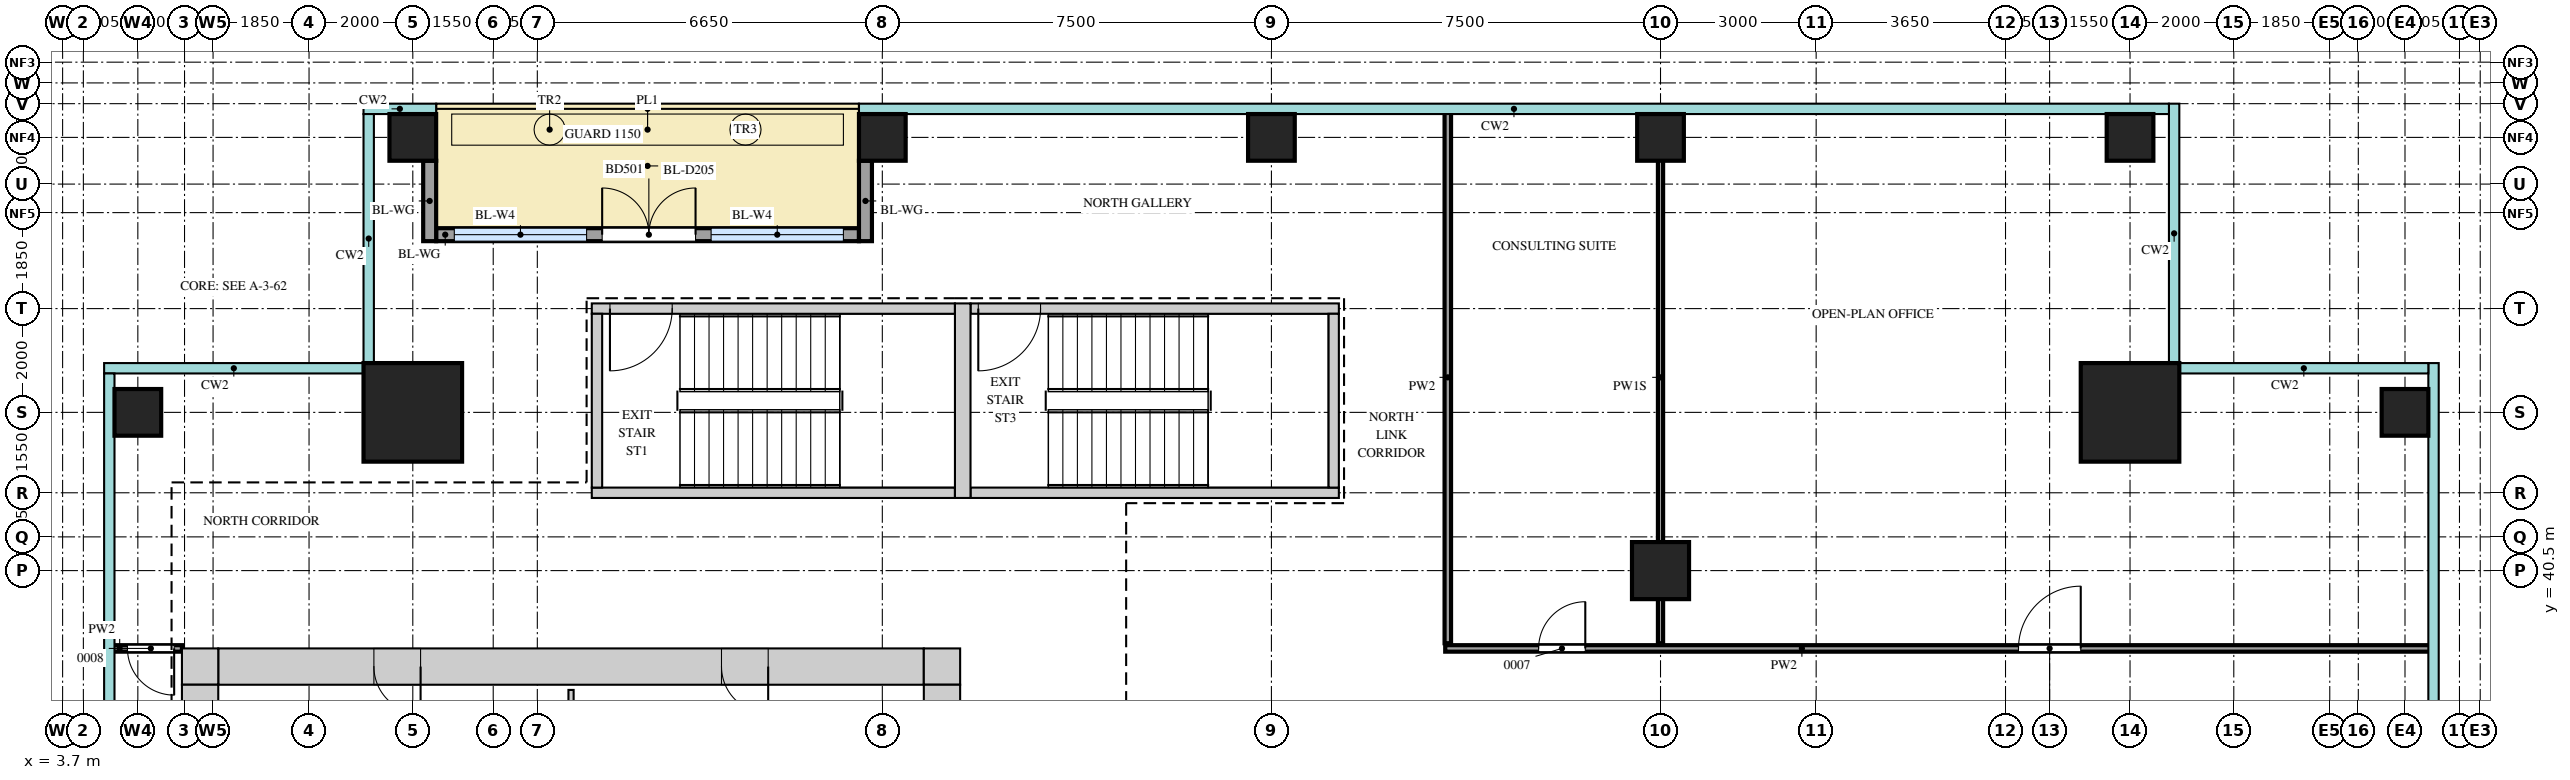
"""IFC4 building model, lengths in metres.
Left out: names, types, materials, properties, quantities, classifications, styles, units other than length and angle.
Written with IfcOpenShell. Run it as: python <this file> out.ifc"""

import sys

from ifc_helpers import new_model, si_unit, direction, frame, frame_2d, origin, origin_2d, place, context, subcontext, project, spatial, rectangle, extrude, source, transform, mapped, element, fill, save


model = new_model("IFC4")
c1 = context("Model", 3, precision=1e-05, world=origin(), true_north=direction((0.0, 1.0)))
c2 = subcontext(c1, "Body", "Model", "MODEL_VIEW")
j1 = project(units=[si_unit("LENGTHUNIT", "METRE"), si_unit("PLANEANGLEUNIT", "RADIAN")], contexts=[c1])
p1 = place(None, origin())
s1 = spatial("IfcSite", under=j1, at=p1, CompositionType="ELEMENT")
p2 = place(p1, origin())
s2 = spatial("IfcBuilding", under=s1, at=p2, CompositionType="ELEMENT")
p3 = place(p2, frame((0.0, 0.0, 226.2)))
s3 = spatial("IfcBuildingStorey", under=s2, at=p3, CompositionType="ELEMENT", Elevation=226.2)
m1 = source(origin(), c2, "Body", "SweptSolid", [
    extrude(rectangle(XDim=13.6, YDim=0.7, at=frame_2d((6.8, 0.0))), origin(), (0.0, 0.0, 1.0), 3.75),
])
p4 = place(p3, frame((6.7, 38.65, 0.0), z_axis=(0.0, 0.0, 1.0), x_axis=(1.0, 0.0, 0.0)))
e1 = element("IfcWall", 1, at=p4, inside=s3, PredefinedType="SHEAR", context=c2, shape_type="MappedRepresentation", body=[
    mapped(m1, transform((0.0, 0.0, 0.0))),
])
m2 = source(origin(), c2, "Body", "SweptSolid", [
    extrude(rectangle(XDim=0.9, YDim=2.1, at=frame_2d((0.45, 1.05))), frame((0.0, 0.36, 0.0), z_axis=(0.0, -1.0, 0.0), x_axis=(1.0, 0.0, 0.0)), (0.0, 0.0, 1.0), 0.72),
])
p5 = place(p4, frame((3.0, 0.0, 0.0)))
e2 = element("IfcOpeningElement", 2, at=p5, cuts=e1, PredefinedType="OPENING", context=c2, shape_type="MappedRepresentation", body=[
    mapped(m2, transform((0.0, 0.0, 0.0))),
])
p6 = place(p4, frame((9.7, 0.0, 0.0)))
e3 = element("IfcOpeningElement", 3, at=p6, cuts=e1, PredefinedType="OPENING", context=c2, shape_type="MappedRepresentation", body=[
    mapped(m2, transform((0.0, 0.0, 0.0))),
])
m3 = source(origin(), c2, "Body", "SweptSolid", [
    extrude(rectangle(XDim=0.7, YDim=0.7, at=frame_2d((0.35, 0.0))), origin(), (0.0, 0.0, 1.0), 3.75),
])
for number, where, z_axis, x_axis in (
    (4, (20.3, 38.65, 0.0), (0.0, 0.0, 1.0), (1.0, 0.0, 0.0)),
    (5, (6.0, 38.65, 0.0), (0.0, 0.0, 1.0), (1.0, 0.0, 0.0)),
):
    element("IfcWall", number, at=place(p3, frame(where, z_axis=z_axis, x_axis=x_axis)), inside=s3, PredefinedType="SHEAR", context=c2, shape_type="MappedRepresentation", body=[
        mapped(m3, transform((0.0, 0.0, 0.0))),
    ])
m4 = source(origin(), c2, "Body", "SweptSolid", [
    extrude(rectangle(XDim=22.6, YDim=0.7, at=frame_2d((11.3, 0.0))), origin(), (0.0, 0.0, 1.0), 3.75),
])
p7 = place(p3, frame((20.65, 15.7, 0.0), z_axis=(0.0, 0.0, 1.0), x_axis=(0.0, 1.0, 0.0)))
e6 = element("IfcWall", 6, at=p7, inside=s3, PredefinedType="SHEAR", context=c2, shape_type="MappedRepresentation", body=[
    mapped(m4, transform((0.0, 0.0, 0.0))),
])
m5 = source(origin(), c2, "Body", "SweptSolid", [
    extrude(rectangle(XDim=1.8, YDim=2.1, at=frame_2d((0.9, 1.05))), frame((0.0, 0.36, 0.0), z_axis=(0.0, -1.0, 0.0), x_axis=(1.0, 0.0, 0.0)), (0.0, 0.0, 1.0), 0.72),
])
p8 = place(p7, frame((10.8, 0.0, 0.0)))
e7 = element("IfcOpeningElement", 7, at=p8, cuts=e6, PredefinedType="OPENING", context=c2, shape_type="MappedRepresentation", body=[
    mapped(m5, transform((0.0, 0.0, 0.0))),
])
p9 = place(p7, frame((0.45, 0.0, 0.0)))
e8 = element("IfcOpeningElement", 8, at=p9, cuts=e6, PredefinedType="OPENING", context=c2, shape_type="MappedRepresentation", body=[
    mapped(m2, transform((0.0, 0.0, 0.0))),
])
p10 = place(p7, frame((2.9, 0.0, 0.0)))
e9 = element("IfcOpeningElement", 9, at=p10, cuts=e6, PredefinedType="OPENING", context=c2, shape_type="MappedRepresentation", body=[
    mapped(m2, transform((0.0, 0.0, 0.0))),
])
p11 = place(p7, frame((5.65, 0.0, 0.0)))
e10 = element("IfcOpeningElement", 10, at=p11, cuts=e6, PredefinedType="OPENING", context=c2, shape_type="MappedRepresentation", body=[
    mapped(m2, transform((0.0, 0.0, 0.0))),
])
p12 = place(p3, frame((6.35, 15.7, 0.0), z_axis=(0.0, 0.0, 1.0), x_axis=(0.0, 1.0, 0.0)))
e11 = element("IfcWall", 11, at=p12, inside=s3, PredefinedType="SHEAR", context=c2, shape_type="MappedRepresentation", body=[
    mapped(m4, transform((0.0, 0.0, 0.0))),
])
m6 = source(origin(), c2, "Body", "SweptSolid", [
    extrude(rectangle(XDim=7.0, YDim=0.2, at=frame_2d((3.5, 0.0))), origin(), (0.0, 0.0, 1.0), 3.75),
])
p13 = place(p3, frame((13.9, 45.55, 0.0), z_axis=(0.0, 0.0, 1.0), x_axis=(1.0, 0.0, 0.0)))
e12 = element("IfcWall", 12, at=p13, inside=s3, PredefinedType="SHEAR", context=c2, shape_type="MappedRepresentation", body=[
    mapped(m6, transform((0.0, 0.0, 0.0))),
])
m7 = source(origin(), c2, "Body", "SweptSolid", [
    extrude(rectangle(XDim=1.2, YDim=2.1, at=frame_2d((0.6, 1.05))), frame((0.0, 0.11, 0.0), z_axis=(0.0, -1.0, 0.0), x_axis=(1.0, 0.0, 0.0)), (0.0, 0.0, 1.0), 0.22),
])
p14 = place(p13, frame((0.35, 0.0, 0.0)))
e13 = element("IfcOpeningElement", 13, at=p14, cuts=e12, PredefinedType="OPENING", context=c2, shape_type="MappedRepresentation", body=[
    mapped(m7, transform((0.0, 0.0, 0.0))),
])
p15 = place(p3, frame((13.9, 42.0, 0.0), z_axis=(0.0, 0.0, 1.0), x_axis=(1.0, 0.0, 0.0)))
e14 = element("IfcWall", 14, at=p15, inside=s3, PredefinedType="SHEAR", context=c2, shape_type="MappedRepresentation", body=[
    mapped(m6, transform((0.0, 0.0, 0.0))),
])
m8 = source(origin(), c2, "Body", "SweptSolid", [
    extrude(rectangle(XDim=7.1, YDim=0.2, at=frame_2d((3.55, 0.0))), origin(), (0.0, 0.0, 1.0), 3.75),
])
p16 = place(p3, frame((21.2, 45.55, 0.0), z_axis=(0.0, 0.0, 1.0), x_axis=(1.0, 0.0, 0.0)))
e15 = element("IfcWall", 15, at=p16, inside=s3, PredefinedType="SHEAR", context=c2, shape_type="MappedRepresentation", body=[
    mapped(m8, transform((0.0, 0.0, 0.0))),
])
p17 = place(p16, frame((0.15, 0.0, 0.0)))
e16 = element("IfcOpeningElement", 16, at=p17, cuts=e15, PredefinedType="OPENING", context=c2, shape_type="MappedRepresentation", body=[
    mapped(m7, transform((0.0, 0.0, 0.0))),
])
p18 = place(p3, frame((21.2, 42.0, 0.0), z_axis=(0.0, 0.0, 1.0), x_axis=(1.0, 0.0, 0.0)))
e17 = element("IfcWall", 17, at=p18, inside=s3, PredefinedType="SHEAR", context=c2, shape_type="MappedRepresentation", body=[
    mapped(m8, transform((0.0, 0.0, 0.0))),
])
m9 = source(origin(), c2, "Body", "SweptSolid", [
    extrude(rectangle(XDim=3.75, YDim=0.3, at=frame_2d((1.875, 0.0))), origin(), (0.0, 0.0, 1.0), 3.75),
])
p19 = place(p3, frame((21.05, 41.9, 0.0), z_axis=(0.0, 0.0, 1.0), x_axis=(0.0, 1.0, 0.0)))
e18 = element("IfcWall", 18, at=p19, inside=s3, PredefinedType="SHEAR", context=c2, shape_type="MappedRepresentation", body=[
    mapped(m9, transform((0.0, 0.0, 0.0))),
])
m10 = source(origin(), c2, "Body", "SweptSolid", [
    extrude(rectangle(XDim=3.35, YDim=0.2, at=frame_2d((1.675, 0.0))), origin(), (0.0, 0.0, 1.0), 3.75),
])
for number, where, z_axis, x_axis in (
    (19, (14.0, 42.1, 0.0), (0.0, 0.0, 1.0), (0.0, 1.0, 0.0)),
    (20, (28.2, 42.1, 0.0), (0.0, 0.0, 1.0), (0.0, 1.0, 0.0)),
):
    element("IfcWall", number, at=place(p3, frame(where, z_axis=z_axis, x_axis=x_axis)), inside=s3, PredefinedType="SHEAR", context=c2, shape_type="MappedRepresentation", body=[
        mapped(m10, transform((0.0, 0.0, 0.0))),
    ])
m11 = source(origin(), c2, "Body", "SweptSolid", [
    extrude(rectangle(XDim=1.9, YDim=1.9, at=origin_2d()), origin(), (0.0, 0.0, 1.0), 4.0),
])
for number, where, z_axis, x_axis in (
    (21, (43.55, 43.55, 0.0), (0.0, 0.0, 1.0), (1.0, 0.0, 0.0)),
    (22, (10.45, 43.55, 0.0), (0.0, 0.0, 1.0), (1.0, 0.0, 0.0)),
):
    element("IfcColumn", number, at=place(p3, frame(where, z_axis=z_axis, x_axis=x_axis)), inside=s3, PredefinedType="COLUMN", context=c2, shape_type="MappedRepresentation", body=[
        mapped(m11, transform((0.0, 0.0, 0.0))),
    ])
m12 = source(origin(), c2, "Body", "SweptSolid", [
    extrude(rectangle(XDim=0.9, YDim=0.9, at=origin_2d()), origin(), (0.0, 0.0, 1.0), 3.75),
])
for number, where, z_axis, x_axis in (
    (23, (48.85, 43.55, 0.0), (0.0, 0.0, 1.0), (1.0, 0.0, 0.0)),
    (24, (10.45, 48.85, 0.0), (0.0, 0.0, 1.0), (1.0, 0.0, 0.0)),
    (25, (19.5, 48.85, 0.0), (0.0, 0.0, 1.0), (1.0, 0.0, 0.0)),
    (26, (27.0, 48.85, 0.0), (0.0, 0.0, 1.0), (1.0, 0.0, 0.0)),
    (27, (34.5, 48.85, 0.0), (0.0, 0.0, 1.0), (1.0, 0.0, 0.0)),
    (28, (43.55, 48.85, 0.0), (0.0, 0.0, 1.0), (1.0, 0.0, 0.0)),
    (29, (5.15, 43.55, 0.0), (0.0, 0.0, 1.0), (1.0, 0.0, 0.0)),
):
    element("IfcColumn", number, at=place(p3, frame(where, z_axis=z_axis, x_axis=x_axis)), inside=s3, PredefinedType="COLUMN", context=c2, shape_type="MappedRepresentation", body=[
        mapped(m12, transform((0.0, 0.0, 0.0))),
    ])
m13 = source(origin(), c2, "Body", "SweptSolid", [
    extrude(rectangle(XDim=1.1, YDim=1.1, at=origin_2d()), origin(), (0.0, 0.0, 1.0), 3.75),
])
p20 = place(p3, frame((34.5, 40.5, 0.0), z_axis=(0.0, 0.0, 1.0), x_axis=(1.0, 0.0, 0.0)))
e30 = element("IfcColumn", 30, at=p20, inside=s3, PredefinedType="COLUMN", context=c2, shape_type="MappedRepresentation", body=[
    mapped(m13, transform((0.0, 0.0, 0.0))),
])
m14 = source(origin(), c2, "Body", "SweptSolid", [
    extrude(rectangle(XDim=8.15, YDim=0.25, at=frame_2d((4.075, 0.0))), origin(), (0.0, 0.0, 1.0), 3.35),
])
p21 = place(p3, frame((10.9, 46.975, 0.0), z_axis=(0.0, 0.0, 1.0), x_axis=(1.0, 0.0, 0.0)))
e31 = element("IfcWall", 31, at=p21, inside=s3, PredefinedType="SOLIDWALL", context=c2, shape_type="MappedRepresentation", body=[
    mapped(m14, transform((0.0, 0.0, 0.0))),
])
m15 = source(origin(), c2, "Body", "SweptSolid", [
    extrude(rectangle(XDim=2.55, YDim=2.4, at=frame_2d((1.275, 1.2))), frame((0.0, 0.135, 0.0), z_axis=(0.0, -1.0, 0.0), x_axis=(1.0, 0.0, 0.0)), (0.0, 0.0, 1.0), 0.27),
])
p22 = place(p21, frame((0.35, 0.0, 0.0)))
e32 = element("IfcOpeningElement", 32, at=p22, cuts=e31, PredefinedType="OPENING", context=c2, shape_type="MappedRepresentation", body=[
    mapped(m15, transform((0.0, 0.0, 0.0))),
])
p23 = place(p21, frame((5.3, 0.0, 0.0)))
e33 = element("IfcOpeningElement", 33, at=p23, cuts=e31, PredefinedType="OPENING", context=c2, shape_type="MappedRepresentation", body=[
    mapped(m15, transform((0.0, 0.0, 0.0))),
])
m16 = source(origin(), c2, "Body", "SweptSolid", [
    extrude(rectangle(XDim=1.8, YDim=2.4, at=frame_2d((0.9, 1.2))), frame((0.0, 0.135, 0.0), z_axis=(0.0, -1.0, 0.0), x_axis=(1.0, 0.0, 0.0)), (0.0, 0.0, 1.0), 0.27),
])
p24 = place(p21, frame((3.2, 0.0, 0.0)))
e34 = element("IfcOpeningElement", 34, at=p24, cuts=e31, PredefinedType="OPENING", context=c2, shape_type="MappedRepresentation", body=[
    mapped(m16, transform((0.0, 0.0, 0.0))),
])
m17 = source(origin(), c2, "Body", "SweptSolid", [
    extrude(rectangle(XDim=1.55, YDim=0.25, at=frame_2d((0.775, 0.0))), origin(), (0.0, 0.0, 1.0), 3.35),
])
for number, where, z_axis, x_axis in (
    (35, (10.775, 48.4, 0.0), (0.0, 0.0, 1.0), (0.0, -1.0, 0.0)),
    (36, (19.175, 48.4, 0.0), (0.0, 0.0, 1.0), (0.0, -1.0, 0.0)),
):
    element("IfcWall", number, at=place(p3, frame(where, z_axis=z_axis, x_axis=x_axis)), inside=s3, PredefinedType="SOLIDWALL", context=c2, shape_type="MappedRepresentation", body=[
        mapped(m17, transform((0.0, 0.0, 0.0))),
    ])
m18 = source(origin(), c2, "Body", "SweptSolid", [
    extrude(rectangle(XDim=6.0, YDim=0.1, at=frame_2d((3.0, 0.0))), origin(), (0.0, 0.0, 1.0), 3.8),
])
p25 = place(p3, frame((13.5, 32.2, 0.0), z_axis=(0.0, 0.0, 1.0), x_axis=(0.0, 1.0, 0.0)))
e37 = element("IfcWall", 37, at=p25, inside=s3, PredefinedType="PARTITIONING", context=c2, shape_type="MappedRepresentation", body=[
    mapped(m18, transform((0.0, 0.0, 0.0))),
])
m19 = source(origin(), c2, "Body", "SweptSolid", [
    extrude(rectangle(XDim=1.35, YDim=0.125, at=frame_2d((0.675, 0.0))), origin(), (0.0, 0.0, 1.0), 3.8),
])
p26 = place(p3, frame((4.65, 39.0, 0.0), z_axis=(0.0, 0.0, 1.0), x_axis=(1.0, 0.0, 0.0)))
e38 = element("IfcWall", 38, at=p26, inside=s3, PredefinedType="PARTITIONING", context=c2, shape_type="MappedRepresentation", body=[
    mapped(m19, transform((0.0, 0.0, 0.0))),
])
m20 = source(origin(), c2, "Body", "SweptSolid", [
    extrude(rectangle(XDim=0.9, YDim=2.1, at=frame_2d((0.45, 1.05))), frame((0.0, 0.073, 0.0), z_axis=(0.0, -1.0, 0.0), x_axis=(1.0, 0.0, 0.0)), (0.0, 0.0, 1.0), 0.145),
])
p27 = place(p26, frame((0.3, 0.0, 0.0)))
e39 = element("IfcOpeningElement", 39, at=p27, cuts=e38, PredefinedType="OPENING", context=c2, shape_type="MappedRepresentation", body=[
    mapped(m20, transform((0.0, 0.0, 0.0))),
])
m21 = source(origin(), c2, "Body", "SweptSolid", [
    extrude(rectangle(XDim=19.0, YDim=0.125, at=frame_2d((9.5, 0.0))), origin(), (0.0, 0.0, 1.0), 3.8),
])
p28 = place(p3, frame((30.35, 39.0, 0.0), z_axis=(0.0, 0.0, 1.0), x_axis=(1.0, 0.0, 0.0)))
e40 = element("IfcWall", 40, at=p28, inside=s3, PredefinedType="PARTITIONING", context=c2, shape_type="MappedRepresentation", body=[
    mapped(m21, transform((0.0, 0.0, 0.0))),
])
p29 = place(p28, frame((1.8, 0.0, 0.0)))
e41 = element("IfcOpeningElement", 41, at=p29, cuts=e40, PredefinedType="OPENING", context=c2, shape_type="MappedRepresentation", body=[
    mapped(m20, transform((0.0, 0.0, 0.0))),
])
m22 = source(origin(), c2, "Body", "SweptSolid", [
    extrude(rectangle(XDim=1.2, YDim=2.1, at=frame_2d((0.6, 1.05))), frame((0.0, 0.073, 0.0), z_axis=(0.0, -1.0, 0.0), x_axis=(1.0, 0.0, 0.0)), (0.0, 0.0, 1.0), 0.145),
])
p30 = place(p28, frame((11.05, 0.0, 0.0)))
e42 = element("IfcOpeningElement", 42, at=p30, cuts=e40, PredefinedType="OPENING", context=c2, shape_type="MappedRepresentation", body=[
    mapped(m22, transform((0.0, 0.0, 0.0))),
])
m23 = source(origin(), c2, "Body", "SweptSolid", [
    extrude(rectangle(XDim=10.25, YDim=0.125, at=frame_2d((5.125, 0.0))), origin(), (0.0, 0.0, 1.0), 3.8),
])
p31 = place(p3, frame((30.4, 39.1, 0.0), z_axis=(0.0, 0.0, 1.0), x_axis=(0.0, 1.0, 0.0)))
e43 = element("IfcWall", 43, at=p31, inside=s3, PredefinedType="PARTITIONING", context=c2, shape_type="MappedRepresentation", body=[
    mapped(m23, transform((0.0, 0.0, 0.0))),
])
m24 = source(origin(), c2, "Body", "SweptSolid", [
    extrude(rectangle(XDim=10.25, YDim=0.1, at=frame_2d((5.125, 0.0))), origin(), (0.0, 0.0, 1.0), 3.35),
])
p32 = place(p3, frame((34.5, 39.1, 0.0), z_axis=(0.0, 0.0, 1.0), x_axis=(0.0, 1.0, 0.0)))
e44 = element("IfcWall", 44, at=p32, inside=s3, PredefinedType="PARTITIONING", context=c2, shape_type="MappedRepresentation", body=[
    mapped(m24, transform((0.0, 0.0, 0.0))),
])
m25 = source(origin(), c2, "Body", "SweptSolid", [
    extrude(rectangle(XDim=2.55, YDim=2.4, at=frame_2d((1.275, 1.2))), frame((0.0, 0.03, 0.0), z_axis=(0.0, -1.0, 0.0), x_axis=(1.0, 0.0, 0.0)), (0.0, 0.0, 1.0), 0.06),
])
p33 = place(p22, origin())
e45 = element("IfcWindow", 45, at=p33, inside=s3, PartitioningType="SINGLE_PANEL", PredefinedType="WINDOW", context=c2, shape_type="MappedRepresentation", body=[
    mapped(m25, transform((0.0, 0.0, 0.0))),
])
fill(e32, e45)
p34 = place(p23, origin())
e46 = element("IfcWindow", 46, at=p34, inside=s3, PartitioningType="SINGLE_PANEL", PredefinedType="WINDOW", context=c2, shape_type="MappedRepresentation", body=[
    mapped(m25, transform((0.0, 0.0, 0.0))),
])
fill(e33, e46)
m26 = source(origin(), c2, "Body", "SweptSolid", [
    extrude(rectangle(XDim=1.8, YDim=2.4, at=frame_2d((0.9, 1.2))), frame((0.0, 0.025, 0.0), z_axis=(0.0, -1.0, 0.0), x_axis=(1.0, 0.0, 0.0)), (0.0, 0.0, 1.0), 0.05),
])
p35 = place(p24, origin())
e47 = element("IfcDoor", 47, at=p35, inside=s3, OperationType="DOUBLE_DOOR_DOUBLE_SWING", PredefinedType="DOOR", context=c2, shape_type="MappedRepresentation", body=[
    mapped(m26, transform((0.0, 0.0, 0.0))),
])
fill(e34, e47)
m27 = source(origin(), c2, "Body", "SweptSolid", [
    extrude(rectangle(XDim=0.9, YDim=2.1, at=frame_2d((0.45, 1.05))), frame((0.0, 0.3, 0.0), z_axis=(0.0, -1.0, 0.0), x_axis=(1.0, 0.0, 0.0)), (0.0, 0.0, 1.0), 0.6),
])
p36 = place(p5, origin())
e48 = element("IfcDoor", 48, at=p36, inside=s3, OperationType="SINGLE_SWING_RIGHT", PredefinedType="DOOR", context=c2, shape_type="MappedRepresentation", body=[
    mapped(m27, transform((0.0, 0.0, 0.0))),
])
fill(e2, e48)
p37 = place(p6, origin())
e49 = element("IfcDoor", 49, at=p37, inside=s3, OperationType="SINGLE_SWING_RIGHT", PredefinedType="DOOR", context=c2, shape_type="MappedRepresentation", body=[
    mapped(m27, transform((0.0, 0.0, 0.0))),
])
fill(e3, e49)
m28 = source(origin(), c2, "Body", "SweptSolid", [
    extrude(rectangle(XDim=0.9, YDim=2.1, at=frame_2d((0.45, 1.05))), frame((0.0, 0.025, 0.0), z_axis=(0.0, -1.0, 0.0), x_axis=(1.0, 0.0, 0.0)), (0.0, 0.0, 1.0), 0.05),
])
p38 = place(p27, origin())
e50 = element("IfcDoor", 50, at=p38, inside=s3, OperationType="SINGLE_SWING_RIGHT", PredefinedType="DOOR", context=c2, shape_type="MappedRepresentation", body=[
    mapped(m28, transform((0.0, 0.0, 0.0))),
])
fill(e39, e50)
p39 = place(p29, origin())
e51 = element("IfcDoor", 51, at=p39, inside=s3, OperationType="SINGLE_SWING_LEFT", PredefinedType="DOOR", context=c2, shape_type="MappedRepresentation", body=[
    mapped(m28, transform((0.0, 0.0, 0.0))),
])
fill(e41, e51)
m29 = source(origin(), c2, "Body", "SweptSolid", [
    extrude(rectangle(XDim=1.2, YDim=2.1, at=frame_2d((0.6, 1.05))), frame((0.0, 0.025, 0.0), z_axis=(0.0, -1.0, 0.0), x_axis=(1.0, 0.0, 0.0)), (0.0, 0.0, 1.0), 0.05),
])
p40 = place(p30, origin())
e52 = element("IfcDoor", 52, at=p40, inside=s3, OperationType="SINGLE_SWING_LEFT", PredefinedType="DOOR", context=c2, shape_type="MappedRepresentation", body=[
    mapped(m29, transform((0.0, 0.0, 0.0))),
])
fill(e42, e52)
p41 = place(p14, origin())
e53 = element("IfcDoor", 53, at=p41, inside=s3, OperationType="SINGLE_SWING_LEFT", PredefinedType="DOOR", context=c2, shape_type="MappedRepresentation", body=[
    mapped(m29, transform((0.0, 0.0, 0.0))),
])
fill(e13, e53)
p42 = place(p17, origin())
e54 = element("IfcDoor", 54, at=p42, inside=s3, OperationType="SINGLE_SWING_LEFT", PredefinedType="DOOR", context=c2, shape_type="MappedRepresentation", body=[
    mapped(m29, transform((0.0, 0.0, 0.0))),
])
fill(e16, e54)
save(model, sys.argv[1])
